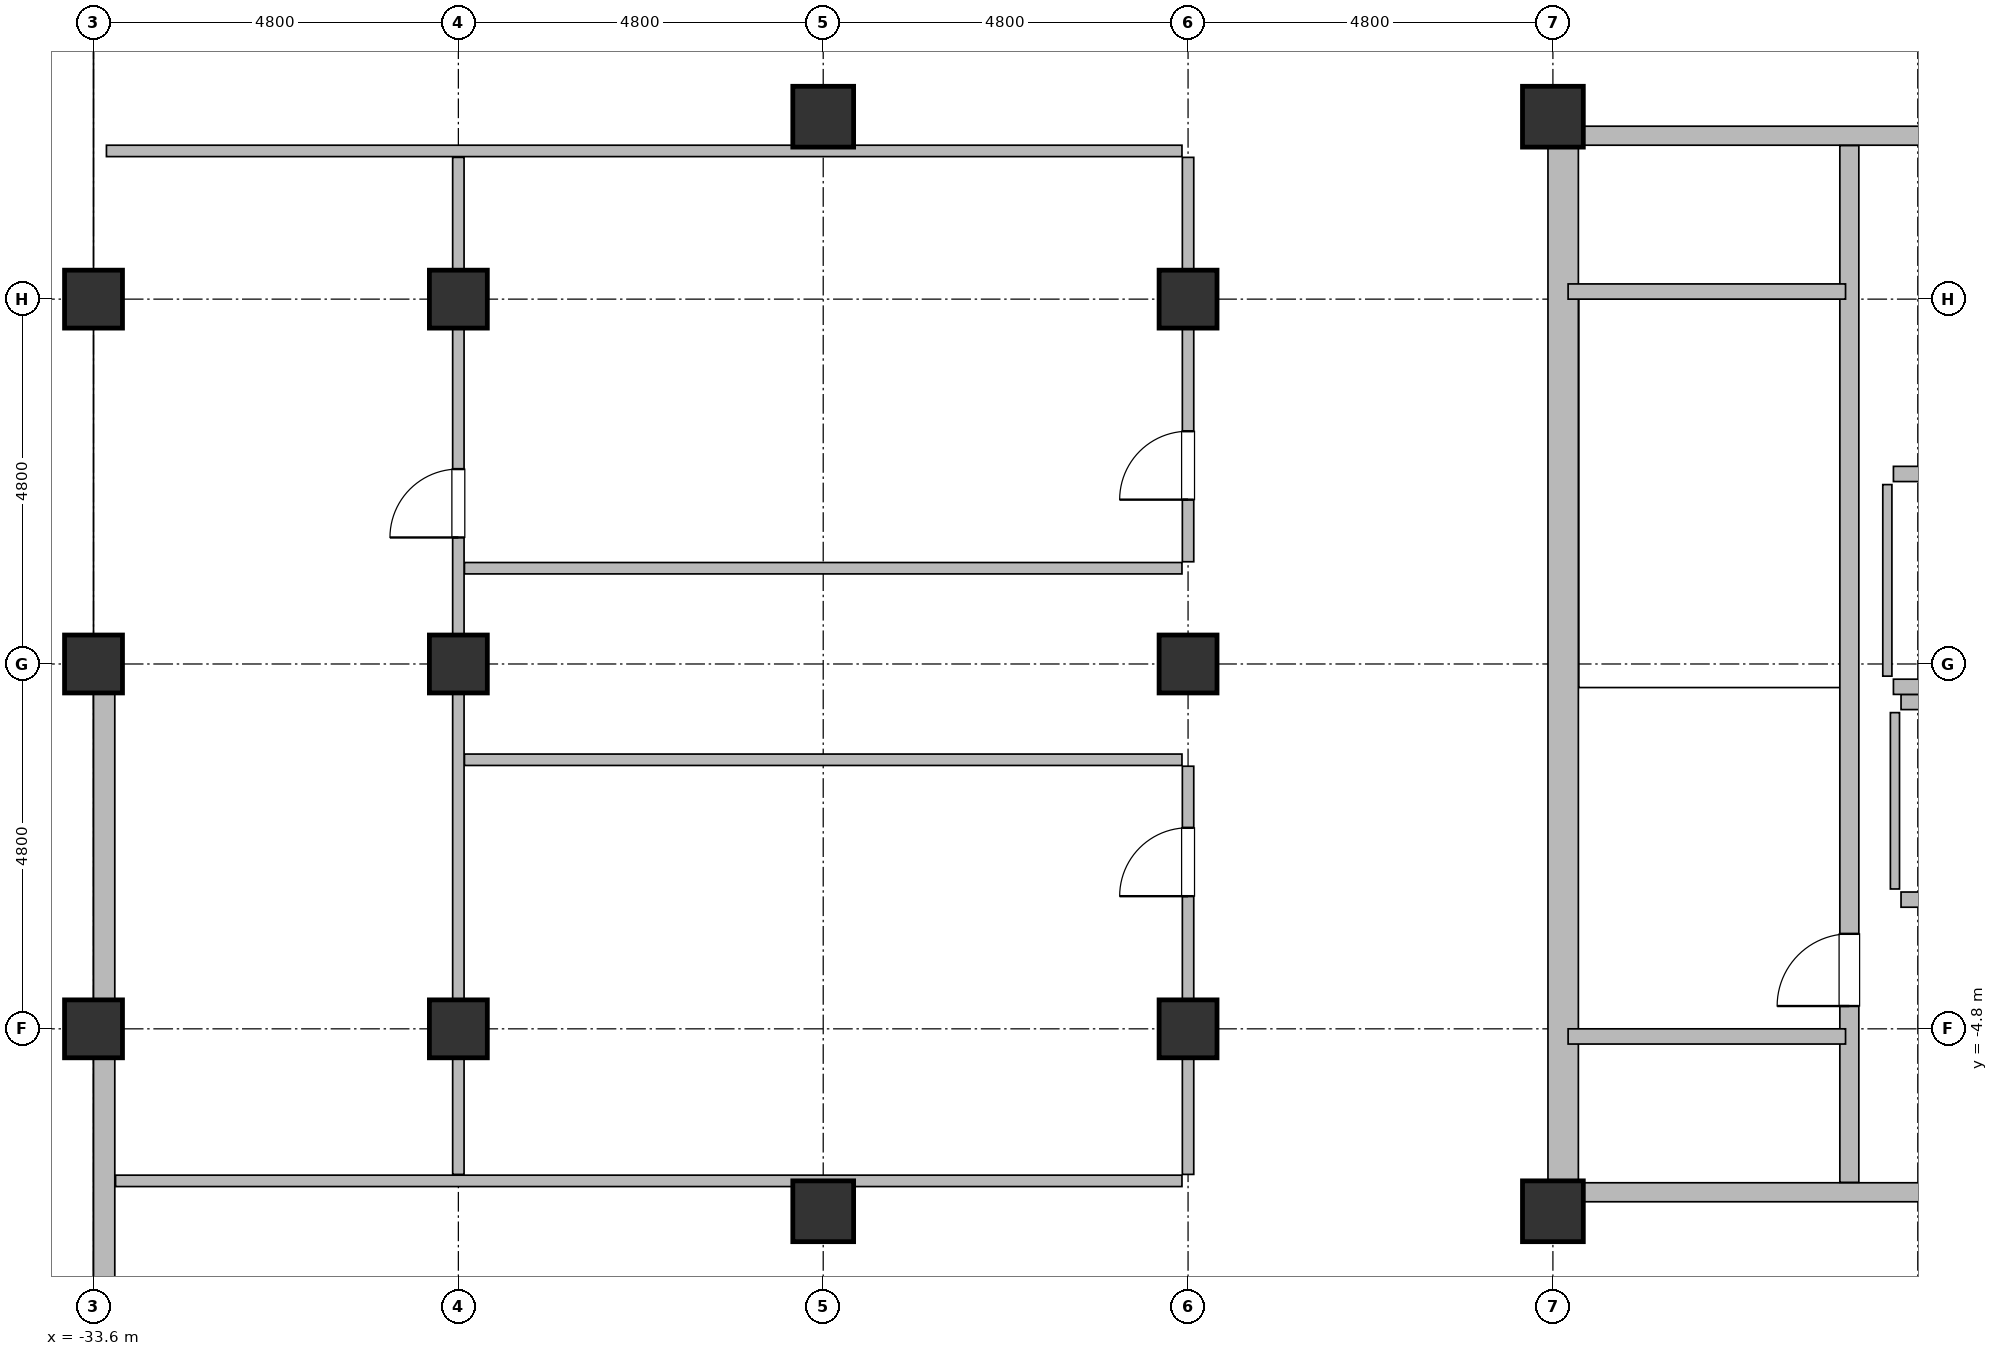
"""IFC4 building model, lengths in metres.
Left out: names, types, materials, properties, quantities, classifications, styles, units other than length and angle.
Written with IfcOpenShell. Run it as: python <this file> out.ifc"""

import sys

from ifc_helpers import new_model, si_unit, direction, frame, frame_2d, origin, origin_2d, place, context, subcontext, project, spatial, rectangle, hollow_rectangle, hollow_circle, extrude, element, fill, save


model = new_model("IFC4")
c1 = context("Model", 3, precision=1e-05, world=origin(), true_north=direction((0.0, 1.0)))
c2 = subcontext(c1, "Body", "Model", "MODEL_VIEW")
j1 = project(units=[si_unit("LENGTHUNIT", "METRE"), si_unit("PLANEANGLEUNIT", "RADIAN")], contexts=[c1])
p1 = place(None, origin())
s1 = spatial("IfcSite", under=j1, at=p1, CompositionType="ELEMENT")
p2 = place(p1, origin())
s2 = spatial("IfcBuilding", under=s1, at=p2, CompositionType="ELEMENT")
p3 = place(p2, frame((0.0, 0.0, 48.5)))
s3 = spatial("IfcBuildingStorey", under=s2, at=p3, CompositionType="ELEMENT", Elevation=48.5)
for number, where, z_axis, x_axis in (
    (1, (-33.6, -4.8, 0.0), (0.0, 0.0, 1.0), (1.0, 0.0, 0.0)),
    (2, (-33.6, 0.0, 0.0), (0.0, 0.0, 1.0), (1.0, 0.0, 0.0)),
    (3, (-33.6, 4.8, 0.0), (0.0, 0.0, 1.0), (1.0, 0.0, 0.0)),
    (4, (-28.8, -4.8, 0.0), (0.0, 0.0, 1.0), (1.0, 0.0, 0.0)),
    (5, (-28.8, 0.0, 0.0), (0.0, 0.0, 1.0), (1.0, 0.0, 0.0)),
    (6, (-28.8, 4.8, 0.0), (0.0, 0.0, 1.0), (1.0, 0.0, 0.0)),
):
    element("IfcColumn", number, at=place(p3, frame(where, z_axis=z_axis, x_axis=x_axis)), inside=s3, PredefinedType="COLUMN", context=c2, shape_type="SweptSolid", body=[
        extrude(hollow_circle(Radius=0.381, WallThickness=0.032, at=origin_2d()), origin(), (0.0, 0.0, 1.0), 3.7),
    ])
for number, where, z_axis, x_axis in (
    (7, (-24.0, -7.2, 0.0), (0.0, 0.0, 1.0), (1.0, 0.0, 0.0)),
    (8, (-24.0, 7.2, 0.0), (0.0, 0.0, 1.0), (1.0, 0.0, 0.0)),
):
    element("IfcColumn", number, at=place(p3, frame(where, z_axis=z_axis, x_axis=x_axis)), inside=s3, PredefinedType="COLUMN", context=c2, shape_type="SweptSolid", body=[
        extrude(hollow_rectangle(XDim=0.8, YDim=0.8, WallThickness=0.036, at=origin_2d()), origin(), (0.0, 0.0, 1.0), 3.7),
    ])
for number, where, z_axis, x_axis in (
    (9, (-19.2, -4.8, 0.0), (0.0, 0.0, 1.0), (1.0, 0.0, 0.0)),
    (10, (-19.2, 0.0, 0.0), (0.0, 0.0, 1.0), (1.0, 0.0, 0.0)),
    (11, (-19.2, 4.8, 0.0), (0.0, 0.0, 1.0), (1.0, 0.0, 0.0)),
):
    element("IfcColumn", number, at=place(p3, frame(where, z_axis=z_axis, x_axis=x_axis)), inside=s3, PredefinedType="COLUMN", context=c2, shape_type="SweptSolid", body=[
        extrude(hollow_circle(Radius=0.381, WallThickness=0.032, at=origin_2d()), origin(), (0.0, 0.0, 1.0), 3.7),
    ])
for number, where, z_axis, x_axis in (
    (12, (-14.4, -7.2, 0.0), (0.0, 0.0, 1.0), (1.0, 0.0, 0.0)),
    (13, (-14.4, 7.2, 0.0), (0.0, 0.0, 1.0), (1.0, 0.0, 0.0)),
):
    element("IfcColumn", number, at=place(p3, frame(where, z_axis=z_axis, x_axis=x_axis)), inside=s3, PredefinedType="COLUMN", context=c2, shape_type="SweptSolid", body=[
        extrude(hollow_rectangle(XDim=0.8, YDim=0.8, WallThickness=0.036, at=origin_2d()), origin(), (0.0, 0.0, 1.0), 3.7),
    ])
p4 = place(p3, frame((-14.265, -7.2, -0.18), z_axis=(0.0, 0.0, 1.0), x_axis=(0.0, 1.0, 0.0)))
e14 = element("IfcWall", 14, at=p4, inside=s3, PredefinedType="SHEAR", context=c2, shape_type="SweptSolid", body=[
    extrude(rectangle(XDim=14.4, YDim=0.4, at=frame_2d((7.2, 0.0))), origin(), (0.0, 0.0, 1.0), 3.7),
])
p5 = place(p3, frame((-33.46, -20.4, 0.0), z_axis=(0.0, 0.0, 1.0), x_axis=(0.0, 1.0, 0.0)))
e15 = element("IfcWall", 15, at=p5, inside=s3, PredefinedType="SOLIDWALL", context=c2, shape_type="SweptSolid", body=[
    extrude(rectangle(XDim=20.38, YDim=0.28, at=frame_2d((10.19, 0.0))), origin(), (0.0, 0.0, 1.0), 2.12),
])
p6 = place(p3, frame((-14.2, -6.95, 0.0), z_axis=(0.0, 0.0, 1.0), x_axis=(1.0, 0.0, 0.0)))
e16 = element("IfcWall", 16, at=p6, inside=s3, PredefinedType="SOLIDWALL", context=c2, shape_type="SweptSolid", body=[
    extrude(rectangle(XDim=9.4, YDim=0.25, at=frame_2d((4.7, 0.0))), origin(), (0.0, 0.0, 1.0), 2.62),
])
p7 = place(p6, frame((4.9, 0.0, 0.0)))
e17 = element("IfcOpeningElement", 17, at=p7, cuts=e16, PredefinedType="OPENING", context=c2, shape_type="SweptSolid", body=[
    extrude(rectangle(XDim=1.0, YDim=2.15, at=frame_2d((0.5, 1.075))), frame((0.0, 0.14, 0.0), z_axis=(0.0, -1.0, 0.0), x_axis=(1.0, 0.0, 0.0)), (0.0, 0.0, 1.0), 0.28),
])
p8 = place(p3, frame((-14.2, 6.95, 0.0), z_axis=(0.0, 0.0, 1.0), x_axis=(1.0, 0.0, 0.0)))
e18 = element("IfcWall", 18, at=p8, inside=s3, PredefinedType="SOLIDWALL", context=c2, shape_type="SweptSolid", body=[
    extrude(rectangle(XDim=9.4, YDim=0.25, at=frame_2d((4.7, 0.0))), origin(), (0.0, 0.0, 1.0), 2.62),
])
p9 = place(p8, frame((4.9, 0.0, 0.0)))
e19 = element("IfcOpeningElement", 19, at=p9, cuts=e18, PredefinedType="OPENING", context=c2, shape_type="SweptSolid", body=[
    extrude(rectangle(XDim=1.0, YDim=2.15, at=frame_2d((0.5, 1.075))), frame((0.0, 0.14, 0.0), z_axis=(0.0, -1.0, 0.0), x_axis=(1.0, 0.0, 0.0)), (0.0, 0.0, 1.0), 0.28),
])
p10 = place(p3, frame((-10.5, -6.82, -0.18), z_axis=(0.0, 0.0, 1.0), x_axis=(0.0, 1.0, 0.0)))
e20 = element("IfcWall", 20, at=p10, inside=s3, PredefinedType="SOLIDWALL", context=c2, shape_type="SweptSolid", body=[
    extrude(rectangle(XDim=13.64, YDim=0.25, at=frame_2d((6.82, 0.0))), origin(), (0.0, 0.0, 1.0), 3.7),
])
p11 = place(p10, frame((2.32, 0.0, 0.18)))
e21 = element("IfcOpeningElement", 21, at=p11, cuts=e20, PredefinedType="OPENING", context=c2, shape_type="SweptSolid", body=[
    extrude(rectangle(XDim=0.95, YDim=2.15, at=frame_2d((0.475, 1.075))), frame((0.0, 0.14, 0.0), z_axis=(0.0, -1.0, 0.0), x_axis=(1.0, 0.0, 0.0)), (0.0, 0.0, 1.0), 0.28),
])
for number, where, z_axis, x_axis in (
    (22, (-14.2, -4.9, -0.18), (0.0, 0.0, 1.0), (1.0, 0.0, 0.0)),
    (23, (-14.2, 4.9, -0.18), (0.0, 0.0, 1.0), (1.0, 0.0, 0.0)),
):
    element("IfcWall", number, at=place(p3, frame(where, z_axis=z_axis, x_axis=x_axis)), inside=s3, PredefinedType="SOLIDWALL", context=c2, shape_type="SweptSolid", body=[
        extrude(rectangle(XDim=3.65, YDim=0.2, at=frame_2d((1.825, 0.0))), origin(), (0.0, 0.0, 1.0), 3.7),
    ])
p12 = place(p3, frame((-9.82, -3.1, 0.0), z_axis=(0.0, 0.0, 1.0), x_axis=(1.0, 0.0, 0.0)))
e24 = element("IfcWall", 24, at=p12, inside=s3, PredefinedType="SOLIDWALL", context=c2, shape_type="SweptSolid", body=[
    extrude(rectangle(XDim=2.04, YDim=0.2, at=frame_2d((1.02, 0.0))), origin(), (0.0, 0.0, 1.0), 3.52),
])
p13 = place(p12, frame((0.47, 0.0, 0.0)))
e25 = element("IfcOpeningElement", 25, at=p13, cuts=e24, PredefinedType="OPENING", context=c2, shape_type="SweptSolid", body=[
    extrude(rectangle(XDim=1.1, YDim=2.2, at=frame_2d((0.55, 1.1))), frame((0.0, 0.115, 0.0), z_axis=(0.0, -1.0, 0.0), x_axis=(1.0, 0.0, 0.0)), (0.0, 0.0, 1.0), 0.23),
])
p14 = place(p3, frame((-9.82, -0.5, 0.0), z_axis=(0.0, 0.0, 1.0), x_axis=(1.0, 0.0, 0.0)))
e26 = element("IfcWall", 26, at=p14, inside=s3, PredefinedType="SOLIDWALL", context=c2, shape_type="SweptSolid", body=[
    extrude(rectangle(XDim=2.04, YDim=0.2, at=frame_2d((1.02, 0.0))), origin(), (0.0, 0.0, 1.0), 3.52),
])
p15 = place(p3, frame((-9.9, -2.96, 0.0), z_axis=(0.0, 0.0, 1.0), x_axis=(0.0, 1.0, 0.0)))
e27 = element("IfcWall", 27, at=p15, inside=s3, PredefinedType="PARTITIONING", context=c2, shape_type="SweptSolid", body=[
    extrude(rectangle(XDim=2.32, YDim=0.12, at=frame_2d((1.16, 0.0))), origin(), (0.0, 0.0, 1.0), 3.52),
])
p16 = place(p3, frame((-9.92, 2.5, 0.0), z_axis=(0.0, 0.0, 1.0), x_axis=(1.0, 0.0, 0.0)))
e28 = element("IfcWall", 28, at=p16, inside=s3, PredefinedType="SOLIDWALL", context=c2, shape_type="SweptSolid", body=[
    extrude(rectangle(XDim=2.24, YDim=0.2, at=frame_2d((1.12, 0.0))), origin(), (0.0, 0.0, 1.0), 3.52),
])
p17 = place(p16, frame((0.495, 0.0, 0.0)))
e29 = element("IfcOpeningElement", 29, at=p17, cuts=e28, PredefinedType="OPENING", context=c2, shape_type="SweptSolid", body=[
    extrude(rectangle(XDim=1.25, YDim=2.25, at=frame_2d((0.625, 1.125))), frame((0.0, 0.115, 0.0), z_axis=(0.0, -1.0, 0.0), x_axis=(1.0, 0.0, 0.0)), (0.0, 0.0, 1.0), 0.23),
])
p18 = place(p3, frame((-9.92, -0.3, 0.0), z_axis=(0.0, 0.0, 1.0), x_axis=(1.0, 0.0, 0.0)))
e30 = element("IfcWall", 30, at=p18, inside=s3, PredefinedType="SOLIDWALL", context=c2, shape_type="SweptSolid", body=[
    extrude(rectangle(XDim=2.24, YDim=0.2, at=frame_2d((1.12, 0.0))), origin(), (0.0, 0.0, 1.0), 3.52),
])
p19 = place(p3, frame((-10.0, -0.16, 0.0), z_axis=(0.0, 0.0, 1.0), x_axis=(0.0, 1.0, 0.0)))
e31 = element("IfcWall", 31, at=p19, inside=s3, PredefinedType="PARTITIONING", context=c2, shape_type="SweptSolid", body=[
    extrude(rectangle(XDim=2.52, YDim=0.12, at=frame_2d((1.26, 0.0))), origin(), (0.0, 0.0, 1.0), 3.52),
])
p20 = place(p3, frame((-33.31, -6.8, 0.0), z_axis=(0.0, 0.0, 1.0), x_axis=(1.0, 0.0, 0.0)))
e32 = element("IfcWall", 32, at=p20, inside=s3, PredefinedType="PARTITIONING", context=c2, shape_type="SweptSolid", body=[
    extrude(rectangle(XDim=14.03, YDim=0.15, at=frame_2d((7.015, 0.0))), origin(), (0.0, 0.0, 1.0), 2.62),
])
for number, where, z_axis, x_axis in (
    (33, (-28.72, -1.26, 0.0), (0.0, 0.0, 1.0), (1.0, 0.0, 0.0)),
    (34, (-28.72, 1.26, 0.0), (0.0, 0.0, 1.0), (1.0, 0.0, 0.0)),
):
    element("IfcWall", number, at=place(p3, frame(where, z_axis=z_axis, x_axis=x_axis)), inside=s3, PredefinedType="PARTITIONING", context=c2, shape_type="SweptSolid", body=[
        extrude(rectangle(XDim=9.44, YDim=0.15, at=frame_2d((4.72, 0.0))), origin(), (0.0, 0.0, 1.0), 2.82),
    ])
p21 = place(p3, frame((-33.43, 6.75, 0.0), z_axis=(0.0, 0.0, 1.0), x_axis=(1.0, 0.0, 0.0)))
e35 = element("IfcWall", 35, at=p21, inside=s3, PredefinedType="PARTITIONING", context=c2, shape_type="SweptSolid", body=[
    extrude(rectangle(XDim=14.15, YDim=0.15, at=frame_2d((7.075, 0.0))), origin(), (0.0, 0.0, 1.0), 2.62),
])
p22 = place(p3, frame((-28.8, -6.715, 0.0), z_axis=(0.0, 0.0, 1.0), x_axis=(0.0, 1.0, 0.0)))
e36 = element("IfcWall", 36, at=p22, inside=s3, PredefinedType="PARTITIONING", context=c2, shape_type="SweptSolid", body=[
    extrude(rectangle(XDim=13.38, YDim=0.15, at=frame_2d((6.69, 0.0))), origin(), (0.0, 0.0, 1.0), 2.82),
])
p23 = place(p22, frame((8.379, 0.0, 0.0)))
e37 = element("IfcOpeningElement", 37, at=p23, cuts=e36, PredefinedType="OPENING", context=c2, shape_type="SweptSolid", body=[
    extrude(rectangle(XDim=0.9, YDim=2.1, at=frame_2d((0.45, 1.05))), frame((0.0, 0.09, 0.0), z_axis=(0.0, -1.0, 0.0), x_axis=(1.0, 0.0, 0.0)), (0.0, 0.0, 1.0), 0.18),
])
p24 = place(p3, frame((-19.2, -6.715, 0.0), z_axis=(0.0, 0.0, 1.0), x_axis=(0.0, 1.0, 0.0)))
e38 = element("IfcWall", 38, at=p24, inside=s3, PredefinedType="PARTITIONING", context=c2, shape_type="SweptSolid", body=[
    extrude(rectangle(XDim=5.37, YDim=0.15, at=frame_2d((2.685, 0.0))), origin(), (0.0, 0.0, 1.0), 2.62),
])
p25 = place(p24, frame((3.66, 0.0, 0.0)))
e39 = element("IfcOpeningElement", 39, at=p25, cuts=e38, PredefinedType="OPENING", context=c2, shape_type="SweptSolid", body=[
    extrude(rectangle(XDim=0.9, YDim=2.1, at=frame_2d((0.45, 1.05))), frame((0.0, 0.09, 0.0), z_axis=(0.0, -1.0, 0.0), x_axis=(1.0, 0.0, 0.0)), (0.0, 0.0, 1.0), 0.18),
])
p26 = place(p3, frame((-19.2, 1.345, 0.0), z_axis=(0.0, 0.0, 1.0), x_axis=(0.0, 1.0, 0.0)))
e40 = element("IfcWall", 40, at=p26, inside=s3, PredefinedType="PARTITIONING", context=c2, shape_type="SweptSolid", body=[
    extrude(rectangle(XDim=5.32, YDim=0.15, at=frame_2d((2.66, 0.0))), origin(), (0.0, 0.0, 1.0), 2.82),
])
p27 = place(p26, frame((0.817, 0.0, 0.0)))
e41 = element("IfcOpeningElement", 41, at=p27, cuts=e40, PredefinedType="OPENING", context=c2, shape_type="SweptSolid", body=[
    extrude(rectangle(XDim=0.9, YDim=2.1, at=frame_2d((0.45, 1.05))), frame((0.0, 0.09, 0.0), z_axis=(0.0, -1.0, 0.0), x_axis=(1.0, 0.0, 0.0)), (0.0, 0.0, 1.0), 0.18),
])
p28 = place(p11, origin())
e42 = element("IfcDoor", 42, at=p28, inside=s3, OperationType="SINGLE_SWING_LEFT", PredefinedType="DOOR", context=c2, shape_type="SweptSolid", body=[
    extrude(rectangle(XDim=0.95, YDim=2.15, at=frame_2d((0.475, 1.075))), frame((0.0, 0.025, 0.0), z_axis=(0.0, -1.0, 0.0), x_axis=(1.0, 0.0, 0.0)), (0.0, 0.0, 1.0), 0.05),
])
fill(e21, e42)
p29 = place(p25, origin())
e43 = element("IfcDoor", 43, at=p29, inside=s3, OperationType="SINGLE_SWING_RIGHT", PredefinedType="DOOR", context=c2, shape_type="SweptSolid", body=[
    extrude(rectangle(XDim=0.9, YDim=2.1, at=frame_2d((0.45, 1.05))), frame((0.0, 0.025, 0.0), z_axis=(0.0, -1.0, 0.0), x_axis=(1.0, 0.0, 0.0)), (0.0, 0.0, 1.0), 0.05),
])
fill(e39, e43)
p30 = place(p27, origin())
e44 = element("IfcDoor", 44, at=p30, inside=s3, OperationType="SINGLE_SWING_LEFT", PredefinedType="DOOR", context=c2, shape_type="SweptSolid", body=[
    extrude(rectangle(XDim=0.9, YDim=2.1, at=frame_2d((0.45, 1.05))), frame((0.0, 0.025, 0.0), z_axis=(0.0, -1.0, 0.0), x_axis=(1.0, 0.0, 0.0)), (0.0, 0.0, 1.0), 0.05),
])
fill(e41, e44)
p31 = place(p23, origin())
e45 = element("IfcDoor", 45, at=p31, inside=s3, OperationType="SINGLE_SWING_RIGHT", PredefinedType="DOOR", context=c2, shape_type="SweptSolid", body=[
    extrude(rectangle(XDim=0.9, YDim=2.1, at=frame_2d((0.45, 1.05))), frame((0.0, 0.025, 0.0), z_axis=(0.0, -1.0, 0.0), x_axis=(1.0, 0.0, 0.0)), (0.0, 0.0, 1.0), 0.05),
])
fill(e37, e45)
save(model, sys.argv[1])
